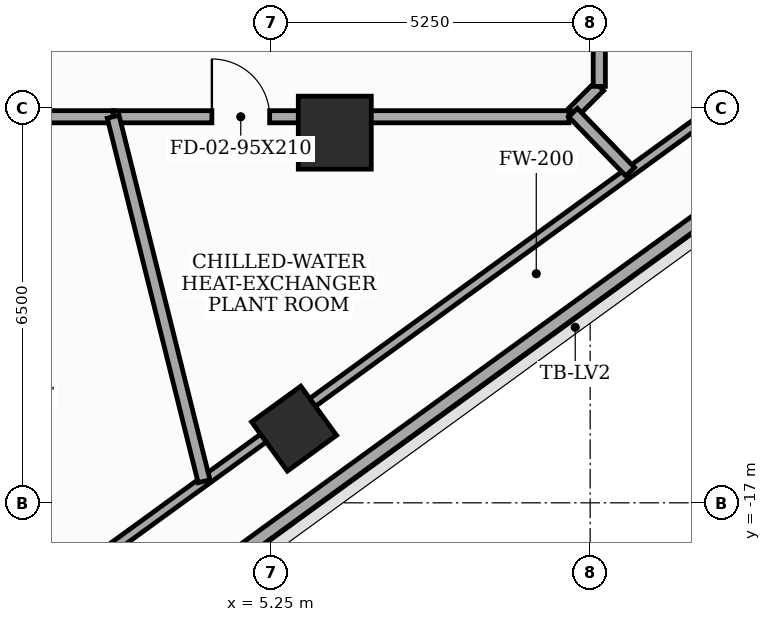
"""IFC4 building model, lengths in metres.
Left out: names, types, materials, properties, quantities, classifications, styles, units other than length and angle.
Written with IfcOpenShell. Run it as: python <this file> out.ifc"""

import sys

from ifc_helpers import new_model, si_unit, direction, frame, frame_2d, origin, origin_2d, place, context, subcontext, project, spatial, rectangle, extrude, element, fill, save


model = new_model("IFC4")
c1 = context("Model", 3, precision=1e-05, world=origin(), true_north=direction((0.0, 1.0)))
c2 = subcontext(c1, "Body", "Model", "MODEL_VIEW")
j1 = project(units=[si_unit("LENGTHUNIT", "METRE"), si_unit("PLANEANGLEUNIT", "RADIAN")], contexts=[c1])
p1 = place(None, origin())
s1 = spatial("IfcSite", under=j1, at=p1, CompositionType="ELEMENT")
p2 = place(p1, origin())
s2 = spatial("IfcBuilding", under=s1, at=p2, CompositionType="ELEMENT")
p3 = place(p2, frame((0.0, 0.0, 149.5)))
s3 = spatial("IfcBuildingStorey", under=s2, at=p3, CompositionType="ELEMENT", Elevation=149.5)
p4 = place(p3, frame((6.3, -10.912, 0.0), z_axis=(0.0, 0.0, 1.0), x_axis=(1.0, 0.0, 0.0)))
e1 = element("IfcColumn", 1, at=p4, inside=s3, PredefinedType="COLUMN", context=c2, shape_type="SweptSolid", body=[
    extrude(rectangle(XDim=1.2, YDim=1.2, at=origin_2d()), origin(), (0.0, 0.0, 1.0), 5.1),
])
p5 = place(p3, frame((5.63, -15.78, 0.0), z_axis=(0.0, 0.0, 1.0), x_axis=(0.809016994375, 0.587785252292, 0.0)))
e2 = element("IfcColumn", 2, at=p5, inside=s3, PredefinedType="COLUMN", context=c2, shape_type="SweptSolid", body=[
    extrude(rectangle(XDim=1.0, YDim=1.0, at=origin_2d()), origin(), (0.0, 0.0, 1.0), 5.1),
])
p6 = place(p3, frame((-8.98, -27.791, 0.0), z_axis=(0.0, 0.0, 1.0), x_axis=(0.809017151105, 0.587785036572, 0.0)))
e3 = element("IfcWall", 3, at=p6, inside=s3, PredefinedType="SOLIDWALL", context=c2, shape_type="SweptSolid", body=[
    extrude(rectangle(XDim=47.2, YDim=0.22, at=frame_2d((23.6, 0.0))), origin(), (0.0, 0.0, 1.0), 4.4),
])
p7 = place(p3, frame((28.291, 0.894, 0.0), z_axis=(0.0, 0.0, 1.0), x_axis=(-0.80901669073, -0.587785670223, 0.0)))
e4 = element("IfcWall", 4, at=p7, inside=s3, PredefinedType="SOLIDWALL", context=c2, shape_type="SweptSolid", body=[
    extrude(rectangle(XDim=46.826, YDim=0.16, at=frame_2d((23.413, 0.0))), origin(), (0.0, 0.0, 1.0), 3.485),
])
p8 = place(p3, frame((-3.054, -10.65, 0.0), z_axis=(0.0, 0.0, 1.0), x_axis=(1.0, 0.0, 0.0)))
e5 = element("IfcWall", 5, at=p8, inside=s3, PredefinedType="SOLIDWALL", context=c2, shape_type="SweptSolid", body=[
    extrude(rectangle(XDim=5.709, YDim=0.2, at=frame_2d((2.854, 0.0))), origin(), (0.0, 0.0, 1.0), 4.285),
])
p9 = place(p8, frame((1.124, 0.0, 0.0)))
e6 = element("IfcOpeningElement", 6, at=p9, cuts=e5, PredefinedType="OPENING", context=c2, shape_type="SweptSolid", body=[
    extrude(rectangle(XDim=0.95, YDim=2.1, at=frame_2d((0.475, 1.05))), frame((0.0, 0.11, 0.0), z_axis=(0.0, -1.0, 0.0), x_axis=(1.0, 0.0, 0.0)), (0.0, 0.0, 1.0), 0.22),
])
p10 = place(p3, frame((2.655, -10.65, 0.0), z_axis=(0.0, 0.0, 1.0), x_axis=(1.0, 0.0, 0.0)))
e7 = element("IfcWall", 7, at=p10, inside=s3, PredefinedType="SOLIDWALL", context=c2, shape_type="SweptSolid", body=[
    extrude(rectangle(XDim=7.495, YDim=0.2, at=frame_2d((3.748, 0.0))), origin(), (0.0, 0.0, 1.0), 4.285),
])
p11 = place(p10, frame((1.624, 0.0, 0.0)))
e8 = element("IfcOpeningElement", 8, at=p11, cuts=e7, PredefinedType="OPENING", context=c2, shape_type="SweptSolid", body=[
    extrude(rectangle(XDim=0.95, YDim=2.1, at=frame_2d((0.475, 1.05))), frame((0.0, 0.11, 0.0), z_axis=(0.0, -1.0, 0.0), x_axis=(1.0, 0.0, 0.0)), (0.0, 0.0, 1.0), 0.22),
])
p12 = place(p3, frame((10.218, -10.582, 0.0), z_axis=(0.0, 0.0, 1.0), x_axis=(0.706906948845, 0.70730655707, 0.0)))
e9 = element("IfcWall", 9, at=p12, inside=s3, PredefinedType="SOLIDWALL", context=c2, shape_type="SweptSolid", body=[
    extrude(rectangle(XDim=0.611, YDim=0.2, at=frame_2d((0.305, 0.0))), origin(), (0.0, 0.0, 1.0), 4.9),
])
p13 = place(p3, frame((10.65, -10.15, 0.0), z_axis=(0.0, 0.0, 1.0), x_axis=(0.0, 1.0, 0.0)))
e10 = element("IfcWall", 10, at=p13, inside=s3, PredefinedType="SOLIDWALL", context=c2, shape_type="SweptSolid", body=[
    extrude(rectangle(XDim=7.096, YDim=0.2, at=frame_2d((3.548, 0.0))), origin(), (0.0, 0.0, 1.0), 3.485),
])
p14 = place(p13, frame((0.944, 0.0, 0.0)))
e11 = element("IfcOpeningElement", 11, at=p14, cuts=e10, PredefinedType="OPENING", context=c2, shape_type="SweptSolid", body=[
    extrude(rectangle(XDim=0.95, YDim=2.1, at=frame_2d((0.475, 1.05))), frame((0.0, 0.11, 0.0), z_axis=(0.0, -1.0, 0.0), x_axis=(1.0, 0.0, 0.0)), (0.0, 0.0, 1.0), 0.22),
])
p15 = place(p3, frame((4.15, -16.645, 0.0), z_axis=(0.0, 0.0, 1.0), x_axis=(-0.241940554085, 0.970291074002, 0.0)))
e12 = element("IfcWall", 12, at=p15, inside=s3, PredefinedType="SOLIDWALL", context=c2, shape_type="SweptSolid", body=[
    extrude(rectangle(XDim=6.179, YDim=0.2, at=frame_2d((3.089, 0.0))), origin(), (0.0, 0.0, 1.0), 3.485),
])
p16 = place(p3, frame((11.157, -11.554, 0.0), z_axis=(0.0, 0.0, 1.0), x_axis=(-0.694717001031, 0.719283176835, 0.0)))
e13 = element("IfcWall", 13, at=p16, inside=s3, PredefinedType="SOLIDWALL", context=c2, shape_type="SweptSolid", body=[
    extrude(rectangle(XDim=1.352, YDim=0.2, at=frame_2d((0.676, 0.0))), origin(), (0.0, 0.0, 1.0), 3.485),
])
p17 = place(p11, origin())
e14 = element("IfcDoor", 14, at=p17, inside=s3, OperationType="SINGLE_SWING_LEFT", PredefinedType="DOOR", context=c2, shape_type="SweptSolid", body=[
    extrude(rectangle(XDim=0.95, YDim=2.1, at=frame_2d((0.475, 1.05))), frame((0.0, 0.025, 0.0), z_axis=(0.0, -1.0, 0.0), x_axis=(1.0, 0.0, 0.0)), (0.0, 0.0, 1.0), 0.05),
])
fill(e8, e14)
save(model, sys.argv[1])
